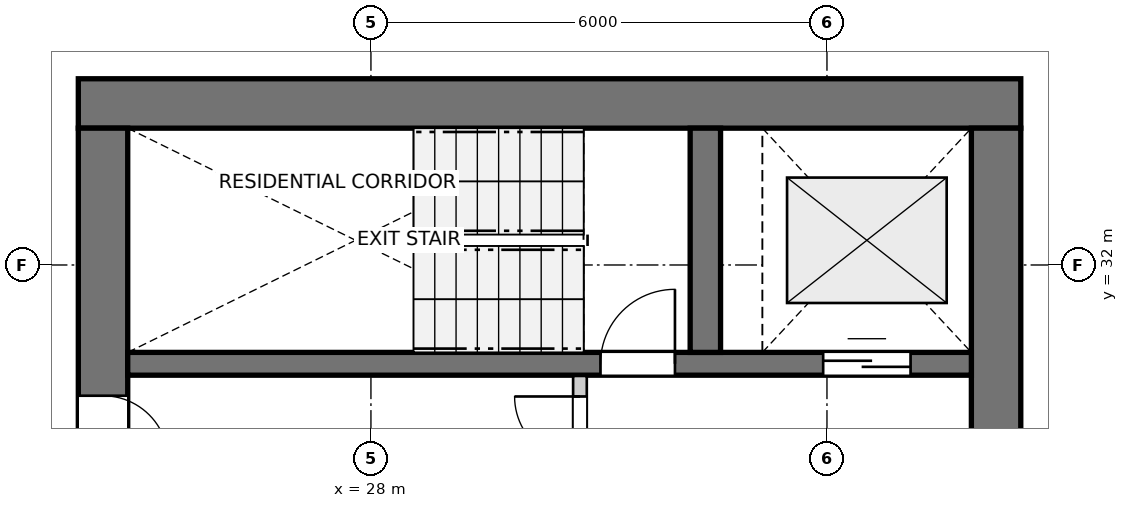
"""IFC4 building model, lengths in metres.
Left out: names, types, materials, properties, quantities, classifications, styles, units other than length and angle.
Written with IfcOpenShell. Run it as: python <this file> out.ifc"""

import sys

from ifc_helpers import new_model, si_unit, direction, frame, frame_2d, origin, place, context, subcontext, project, spatial, rectangle, extrude, source, transform, mapped, element, fill, save


model = new_model("IFC4")
c1 = context("Model", 3, precision=1e-05, world=origin(), true_north=direction((0.0, 1.0)))
c2 = subcontext(c1, "Body", "Model", "MODEL_VIEW")
j1 = project(units=[si_unit("LENGTHUNIT", "METRE"), si_unit("PLANEANGLEUNIT", "RADIAN")], contexts=[c1])
p1 = place(None, origin())
s1 = spatial("IfcSite", under=j1, at=p1, CompositionType="ELEMENT")
p2 = place(p1, origin())
s2 = spatial("IfcBuilding", under=s1, at=p2, CompositionType="ELEMENT")
p3 = place(p2, frame((0.0, 0.0, 105.6)))
s3 = spatial("IfcBuildingStorey", under=s2, at=p3, CompositionType="ELEMENT", Elevation=105.6)
p4 = place(p3, frame((36.55, 34.125, 0.0), z_axis=(0.0, 0.0, 1.0), x_axis=(-1.0, 0.0, 0.0)))
e1 = element("IfcWall", 1, at=p4, inside=s3, PredefinedType="SHEAR", context=c2, shape_type="SweptSolid", body=[
    extrude(rectangle(XDim=12.4, YDim=0.65, at=frame_2d((6.2, 0.0))), origin(), (0.0, 0.0, 1.0), 2.935),
])
p5 = place(p3, frame((24.475, 33.8, 0.0), z_axis=(0.0, 0.0, 1.0), x_axis=(0.0, -1.0, 0.0)))
e2 = element("IfcWall", 2, at=p5, inside=s3, PredefinedType="SHEAR", context=c2, shape_type="SweptSolid", body=[
    extrude(rectangle(XDim=15.6, YDim=0.65, at=frame_2d((7.8, 0.0))), origin(), (0.0, 0.0, 1.0), 2.935),
])
p6 = place(p5, frame((7.05, 0.0, 0.0)))
e3 = element("IfcOpeningElement", 3, at=p6, cuts=e2, PredefinedType="OPENING", context=c2, shape_type="SweptSolid", body=[
    extrude(rectangle(XDim=1.5, YDim=2.15, at=frame_2d((0.75, 1.075))), frame((0.0, 0.335, 0.0), z_axis=(0.0, -1.0, 0.0), x_axis=(1.0, 0.0, 0.0)), (0.0, 0.0, 1.0), 0.67),
])
p7 = place(p5, frame((3.52, 0.0, 0.0)))
e4 = element("IfcOpeningElement", 4, at=p7, cuts=e2, PredefinedType="OPENING", context=c2, shape_type="SweptSolid", body=[
    extrude(rectangle(XDim=0.86, YDim=2.05, at=frame_2d((0.43, 1.025))), frame((0.0, 0.335, 0.0), z_axis=(0.0, -1.0, 0.0), x_axis=(1.0, 0.0, 0.0)), (0.0, 0.0, 1.0), 0.67),
])
p8 = place(p5, frame((11.22, 0.0, 0.0)))
e5 = element("IfcOpeningElement", 5, at=p8, cuts=e2, PredefinedType="OPENING", context=c2, shape_type="SweptSolid", body=[
    extrude(rectangle(XDim=0.86, YDim=2.05, at=frame_2d((0.43, 1.025))), frame((0.0, 0.335, 0.0), z_axis=(0.0, -1.0, 0.0), x_axis=(1.0, 0.0, 0.0)), (0.0, 0.0, 1.0), 0.67),
])
p9 = place(p3, frame((36.225, 18.2, 0.0), z_axis=(0.0, 0.0, 1.0), x_axis=(0.0, 1.0, 0.0)))
e6 = element("IfcWall", 6, at=p9, inside=s3, PredefinedType="SHEAR", context=c2, shape_type="SweptSolid", body=[
    extrude(rectangle(XDim=15.6, YDim=0.65, at=frame_2d((7.8, 0.0))), origin(), (0.0, 0.0, 1.0), 2.935),
])
p10 = place(p9, frame((4.25, 0.0, 0.0)))
e7 = element("IfcOpeningElement", 7, at=p10, cuts=e6, PredefinedType="OPENING", context=c2, shape_type="SweptSolid", body=[
    extrude(rectangle(XDim=1.1, YDim=2.15, at=frame_2d((0.55, 1.075))), frame((0.0, 0.335, 0.0), z_axis=(0.0, -1.0, 0.0), x_axis=(1.0, 0.0, 0.0)), (0.0, 0.0, 1.0), 0.67),
])
p11 = place(p9, frame((10.25, 0.0, 0.0)))
e8 = element("IfcOpeningElement", 8, at=p11, cuts=e6, PredefinedType="OPENING", context=c2, shape_type="SweptSolid", body=[
    extrude(rectangle(XDim=1.1, YDim=2.15, at=frame_2d((0.55, 1.075))), frame((0.0, 0.335, 0.0), z_axis=(0.0, -1.0, 0.0), x_axis=(1.0, 0.0, 0.0)), (0.0, 0.0, 1.0), 0.67),
])
p12 = place(p3, frame((24.8, 30.7, 0.0), z_axis=(0.0, 0.0, 1.0), x_axis=(1.0, 0.0, 0.0)))
e9 = element("IfcWall", 9, at=p12, inside=s3, PredefinedType="SHEAR", context=c2, shape_type="SweptSolid", body=[
    extrude(rectangle(XDim=11.1, YDim=0.3, at=frame_2d((5.55, 0.0))), origin(), (0.0, 0.0, 1.0), 2.935),
])
p13 = place(p12, frame((6.22, 0.0, 0.0)))
e10 = element("IfcOpeningElement", 10, at=p13, cuts=e9, PredefinedType="OPENING", context=c2, shape_type="SweptSolid", body=[
    extrude(rectangle(XDim=0.98, YDim=2.15, at=frame_2d((0.49, 1.075))), frame((0.0, 0.16, 0.0), z_axis=(0.0, -1.0, 0.0), x_axis=(1.0, 0.0, 0.0)), (0.0, 0.0, 1.0), 0.32),
])
p14 = place(p12, frame((9.15, 0.0, 0.0)))
e11 = element("IfcOpeningElement", 11, at=p14, cuts=e9, PredefinedType="OPENING", context=c2, shape_type="SweptSolid", body=[
    extrude(rectangle(XDim=1.15, YDim=2.15, at=frame_2d((0.575, 1.075))), frame((0.0, 0.16, 0.0), z_axis=(0.0, -1.0, 0.0), x_axis=(1.0, 0.0, 0.0)), (0.0, 0.0, 1.0), 0.32),
])
p15 = place(p3, frame((32.4, 30.85, 0.0), z_axis=(0.0, 0.0, 1.0), x_axis=(0.0, 1.0, 0.0)))
e12 = element("IfcWall", 12, at=p15, inside=s3, PredefinedType="SHEAR", context=c2, shape_type="SweptSolid", body=[
    extrude(rectangle(XDim=2.95, YDim=0.4, at=frame_2d((1.475, 0.0))), origin(), (0.0, 0.0, 1.0), 2.935),
])
p16 = place(p3, frame((30.75, 27.43, 0.0), z_axis=(0.0, 0.0, 1.0), x_axis=(0.0, 1.0, 0.0)))
e13 = element("IfcWall", 13, at=p16, inside=s3, PredefinedType="PARTITIONING", context=c2, shape_type="SweptSolid", body=[
    extrude(rectangle(XDim=3.11, YDim=0.18, at=frame_2d((1.555, 0.0))), origin(), (0.0, 0.0, 1.0), 2.935),
])
p17 = place(p16, frame((1.98, 0.0, 0.0)))
e14 = element("IfcOpeningElement", 14, at=p17, cuts=e13, PredefinedType="OPENING", context=c2, shape_type="SweptSolid", body=[
    extrude(rectangle(XDim=0.86, YDim=2.05, at=frame_2d((0.43, 1.025))), frame((0.0, 0.1, 0.0), z_axis=(0.0, -1.0, 0.0), x_axis=(1.0, 0.0, 0.0)), (0.0, 0.0, 1.0), 0.2),
])
m1 = source(origin(), c2, "Body", "SweptSolid", [
    extrude(rectangle(XDim=0.98, YDim=2.15, at=frame_2d((0.49, 1.075))), frame((0.0, 0.025, 0.0), z_axis=(0.0, -1.0, 0.0), x_axis=(1.0, 0.0, 0.0)), (0.0, 0.0, 1.0), 0.05),
])
p18 = place(p13, origin())
e15 = element("IfcDoor", 15, at=p18, inside=s3, OperationType="SINGLE_SWING_RIGHT", PredefinedType="DOOR", context=c2, shape_type="MappedRepresentation", body=[
    mapped(m1, transform((0.0, 0.0, 0.0), x_axis=(1.0, 0.0, 0.0), y_axis=(0.0, 1.0, 0.0), z_axis=(0.0, 0.0, 1.0), scale=1.0)),
])
fill(e10, e15)
m2 = source(origin(), c2, "Body", "SweptSolid", [
    extrude(rectangle(XDim=1.15, YDim=2.15, at=frame_2d((0.575, 1.075))), frame((0.0, 0.025, 0.0), z_axis=(0.0, -1.0, 0.0), x_axis=(1.0, 0.0, 0.0)), (0.0, 0.0, 1.0), 0.05),
])
p19 = place(p14, origin())
e16 = element("IfcDoor", 16, at=p19, inside=s3, OperationType="DOUBLE_DOOR_SLIDING", PredefinedType="DOOR", context=c2, shape_type="MappedRepresentation", body=[
    mapped(m2, transform((0.0, 0.0, 0.0), x_axis=(1.0, 0.0, 0.0), y_axis=(0.0, 1.0, 0.0), z_axis=(0.0, 0.0, 1.0), scale=1.0)),
])
fill(e11, e16)
m3 = source(origin(), c2, "Body", "SweptSolid", [
    extrude(rectangle(XDim=0.86, YDim=2.05, at=frame_2d((0.43, 1.025))), frame((0.0, 0.025, 0.0), z_axis=(0.0, -1.0, 0.0), x_axis=(1.0, 0.0, 0.0)), (0.0, 0.0, 1.0), 0.05),
])
p20 = place(p7, origin())
e17 = element("IfcDoor", 17, at=p20, inside=s3, OperationType="SINGLE_SWING_RIGHT", PredefinedType="DOOR", context=c2, shape_type="MappedRepresentation", body=[
    mapped(m3, transform((0.0, 0.0, 0.0), x_axis=(1.0, 0.0, 0.0), y_axis=(0.0, 1.0, 0.0), z_axis=(0.0, 0.0, 1.0), scale=1.0)),
])
fill(e4, e17)
p21 = place(p17, origin())
e18 = element("IfcDoor", 18, at=p21, inside=s3, OperationType="SINGLE_SWING_RIGHT", PredefinedType="DOOR", context=c2, shape_type="MappedRepresentation", body=[
    mapped(m3, transform((0.0, 0.0, 0.0), x_axis=(1.0, 0.0, 0.0), y_axis=(0.0, 1.0, 0.0), z_axis=(0.0, 0.0, 1.0), scale=1.0)),
])
fill(e14, e18)
save(model, sys.argv[1])
